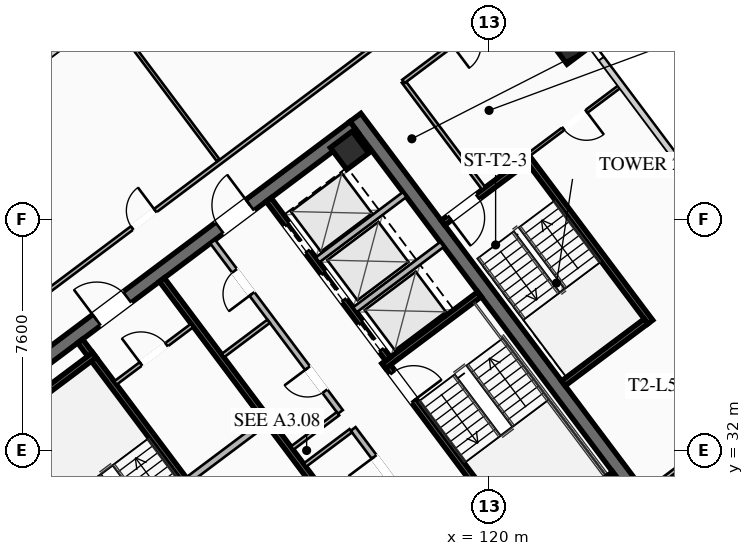
"""IFC4 building model, lengths in metres.
Left out: names, types, materials, properties, quantities, classifications, styles, units other than length and angle.
Written with IfcOpenShell. Run it as: python <this file> out.ifc"""

import sys

from ifc_helpers import new_model, si_unit, direction, frame, frame_2d, origin, origin_2d, place, context, subcontext, project, spatial, rectangle, hollow_rectangle, extrude, element, fill, save


model = new_model("IFC4")
c1 = context("Model", 3, precision=1e-05, world=origin(), true_north=direction((0.0, 1.0)))
c2 = subcontext(c1, "Body", "Model", "MODEL_VIEW")
j1 = project(units=[si_unit("LENGTHUNIT", "METRE"), si_unit("PLANEANGLEUNIT", "RADIAN")], contexts=[c1])
p1 = place(None, origin())
s1 = spatial("IfcSite", under=j1, at=p1, CompositionType="ELEMENT")
p2 = place(p1, origin())
s2 = spatial("IfcBuilding", under=s1, at=p2, CompositionType="ELEMENT")
p3 = place(p2, frame((0.0, 0.0, 207.75)))
s3 = spatial("IfcBuildingStorey", under=s2, at=p3, CompositionType="ELEMENT", Elevation=207.75)
for number, where, z_axis, x_axis in (
    (1, (112.396, 21.047, 0.0), (0.0, 0.0, 1.0), (-0.6, 0.8, 0.0)),
    (2, (115.604, 42.953, 0.0), (0.0, 0.0, 1.0), (0.6, -0.8, 0.0)),
):
    element("IfcWall", number, at=place(p3, frame(where, z_axis=z_axis, x_axis=x_axis)), inside=s3, PredefinedType="SHEAR", context=c2, shape_type="SweptSolid", body=[
        extrude(rectangle(XDim=15.6, YDim=0.45, at=frame_2d((7.8, 0.0))), origin(), (0.0, 0.0, 1.0), 3.55),
    ])
p4 = place(p3, frame((103.351, 33.482, 0.0), z_axis=(0.0, 0.0, 1.0), x_axis=(0.8, 0.6, 0.0)))
e3 = element("IfcWall", 3, at=p4, inside=s3, PredefinedType="SHEAR", context=c2, shape_type="SweptSolid", body=[
    extrude(rectangle(XDim=15.26, YDim=0.45, at=frame_2d((7.63, 0.0))), origin(), (0.0, 0.0, 1.0), 3.55),
])
p5 = place(p4, frame((4.68, 0.0, 0.0)))
e4 = element("IfcOpeningElement", 4, at=p5, cuts=e3, PredefinedType="OPENING", context=c2, shape_type="SweptSolid", body=[
    extrude(rectangle(XDim=1.25, YDim=2.25, at=frame_2d((0.625, 1.125))), frame((0.0, 0.235, 0.0), z_axis=(0.0, -1.0, 0.0), x_axis=(1.0, 0.0, 0.0)), (0.0, 0.0, 1.0), 0.47),
])
p6 = place(p4, frame((9.73, 0.0, 0.0)))
e5 = element("IfcOpeningElement", 5, at=p6, cuts=e3, PredefinedType="OPENING", context=c2, shape_type="SweptSolid", body=[
    extrude(rectangle(XDim=1.25, YDim=2.25, at=frame_2d((0.625, 1.125))), frame((0.0, 0.235, 0.0), z_axis=(0.0, -1.0, 0.0), x_axis=(1.0, 0.0, 0.0)), (0.0, 0.0, 1.0), 0.47),
])
for number, where, z_axis, x_axis in (
    (6, (123.87, 30.59, 0.0), (0.0, 0.0, 1.0), (0.8, 0.6, 0.0)),
    (7, (115.41, 41.87, 0.0), (0.0, 0.0, 1.0), (0.8, 0.6, 0.0)),
):
    element("IfcColumn", number, at=place(p3, frame(where, z_axis=z_axis, x_axis=x_axis)), inside=s3, PredefinedType="COLUMN", context=c2, shape_type="SweptSolid", body=[
        extrude(hollow_rectangle(XDim=0.9, YDim=0.9, WallThickness=0.04, at=origin_2d()), origin(), (0.0, 0.0, 1.0), 3.37),
    ])
p7 = place(p3, frame((122.64, 45.23, 0.0), z_axis=(0.0, 0.0, 1.0), x_axis=(0.799999996291, 0.600000004945, 0.0)))
e8 = element("IfcColumn", 8, at=p7, inside=s3, PredefinedType="COLUMN", context=c2, shape_type="SweptSolid", body=[
    extrude(hollow_rectangle(XDim=0.75, YDim=0.75, WallThickness=0.032, at=origin_2d()), origin(), (0.0, 0.0, 1.0), 3.37),
])
p8 = place(p3, frame((111.44, 29.08, 0.0), z_axis=(0.0, 0.0, 1.0), x_axis=(-0.59999041401, 0.800007189403, 0.0)))
e9 = element("IfcWall", 9, at=p8, inside=s3, PredefinedType="SHEAR", context=c2, shape_type="SweptSolid", body=[
    extrude(rectangle(XDim=8.15, YDim=0.2, at=frame_2d((4.075, 0.0))), origin(), (0.0, 0.0, 1.0), 3.37),
])
p9 = place(p8, frame((0.45, 0.0, 0.0)))
e10 = element("IfcOpeningElement", 10, at=p9, cuts=e9, PredefinedType="OPENING", context=c2, shape_type="SweptSolid", body=[
    extrude(rectangle(XDim=1.15, YDim=2.2, at=frame_2d((0.575, 1.1))), frame((0.0, 0.11, 0.0), z_axis=(0.0, -1.0, 0.0), x_axis=(1.0, 0.0, 0.0)), (0.0, 0.0, 1.0), 0.22),
])
p10 = place(p3, frame((103.876, 32.782, 0.0), z_axis=(0.0, 0.0, 1.0), x_axis=(0.800014909178, 0.599980120581, 0.0)))
e11 = element("IfcWall", 11, at=p10, inside=s3, PredefinedType="SHEAR", context=c2, shape_type="SweptSolid", body=[
    extrude(rectangle(XDim=3.93, YDim=0.2, at=frame_2d((1.965, 0.0))), origin(), (0.0, 0.0, 1.0), 3.37),
])
p11 = place(p3, frame((116.56, 34.92, 0.0), z_axis=(0.0, 0.0, 1.0), x_axis=(0.59999041401, -0.800007189403, 0.0)))
e12 = element("IfcWall", 12, at=p11, inside=s3, PredefinedType="SHEAR", context=c2, shape_type="SweptSolid", body=[
    extrude(rectangle(XDim=8.15, YDim=0.2, at=frame_2d((4.075, 0.0))), origin(), (0.0, 0.0, 1.0), 3.37),
])
p12 = place(p11, frame((0.45, 0.0, 0.0)))
e13 = element("IfcOpeningElement", 13, at=p12, cuts=e12, PredefinedType="OPENING", context=c2, shape_type="SweptSolid", body=[
    extrude(rectangle(XDim=1.15, YDim=2.2, at=frame_2d((0.575, 1.1))), frame((0.0, 0.11, 0.0), z_axis=(0.0, -1.0, 0.0), x_axis=(1.0, 0.0, 0.0)), (0.0, 0.0, 1.0), 0.22),
])
for number, where, z_axis, x_axis in (
    (14, (116.54, 34.78, 0.0), (0.0, 0.0, 1.0), (0.8, 0.6, 0.0)),
    (15, (120.98, 28.86, 0.0), (0.0, 0.0, 1.0), (0.8, 0.6, 0.0)),
):
    element("IfcWall", number, at=place(p3, frame(where, z_axis=z_axis, x_axis=x_axis)), inside=s3, PredefinedType="SHEAR", context=c2, shape_type="SweptSolid", body=[
        extrude(rectangle(XDim=3.93, YDim=0.2, at=frame_2d((1.965, 0.0))), origin(), (0.0, 0.0, 1.0), 3.37),
    ])
p13 = place(p3, frame((118.058, 25.856, 0.0), z_axis=(0.0, 0.0, 1.0), x_axis=(-0.600002657301, 0.799998007018, 0.0)))
e16 = element("IfcWall", 16, at=p13, inside=s3, PredefinedType="SHEAR", context=c2, shape_type="SweptSolid", body=[
    extrude(rectangle(XDim=14.7, YDim=0.2, at=frame_2d((7.35, 0.0))), origin(), (0.0, 0.0, 1.0), 3.37),
])
p14 = place(p3, frame((110.104, 31.028, 0.0), z_axis=(0.0, 0.0, 1.0), x_axis=(0.800018601094, 0.59997519774, 0.0)))
e17 = element("IfcWall", 17, at=p14, inside=s3, PredefinedType="SOLIDWALL", context=c2, shape_type="SweptSolid", body=[
    extrude(rectangle(XDim=3.15, YDim=0.22, at=frame_2d((1.575, 0.0))), origin(), (0.0, 0.0, 1.0), 2.723),
])
p15 = place(p3, frame((112.75, 40.25, 0.0), z_axis=(0.0, 0.0, 1.0), x_axis=(0.599994036198, -0.800004472816, 0.0)))
e18 = element("IfcWall", 18, at=p15, inside=s3, PredefinedType="SHEAR", context=c2, shape_type="SweptSolid", body=[
    extrude(rectangle(XDim=6.55, YDim=0.2, at=frame_2d((3.275, 0.0))), origin(), (0.0, 0.0, 1.0), 3.37),
])
p16 = place(p15, frame((5.075, 0.0, 0.0)))
e19 = element("IfcOpeningElement", 19, at=p16, cuts=e18, PredefinedType="OPENING", context=c2, shape_type="SweptSolid", body=[
    extrude(rectangle(XDim=1.1, YDim=2.2, at=frame_2d((0.55, 1.1))), frame((0.0, 0.11, 0.0), z_axis=(0.0, -1.0, 0.0), x_axis=(1.0, 0.0, 0.0)), (0.0, 0.0, 1.0), 0.22),
])
p17 = place(p15, frame((3.025, 0.0, 0.0)))
e20 = element("IfcOpeningElement", 20, at=p17, cuts=e18, PredefinedType="OPENING", context=c2, shape_type="SweptSolid", body=[
    extrude(rectangle(XDim=1.1, YDim=2.2, at=frame_2d((0.55, 1.1))), frame((0.0, 0.11, 0.0), z_axis=(0.0, -1.0, 0.0), x_axis=(1.0, 0.0, 0.0)), (0.0, 0.0, 1.0), 0.22),
])
p18 = place(p15, frame((1.025, 0.0, 0.0)))
e21 = element("IfcOpeningElement", 21, at=p18, cuts=e18, PredefinedType="OPENING", context=c2, shape_type="SweptSolid", body=[
    extrude(rectangle(XDim=1.1, YDim=2.2, at=frame_2d((0.55, 1.1))), frame((0.0, 0.11, 0.0), z_axis=(0.0, -1.0, 0.0), x_axis=(1.0, 0.0, 0.0)), (0.0, 0.0, 1.0), 0.22),
])
for number, where, z_axis, x_axis in (
    (22, (115.59, 36.63, 0.0), (0.0, 0.0, 1.0), (0.8, 0.6, 0.0)),
    (23, (114.36, 38.27, 0.0), (0.0, 0.0, 1.0), (0.8, 0.6, 0.0)),
):
    element("IfcWall", number, at=place(p3, frame(where, z_axis=z_axis, x_axis=x_axis)), inside=s3, PredefinedType="SOLIDWALL", context=c2, shape_type="SweptSolid", body=[
        extrude(rectangle(XDim=3.58, YDim=0.2, at=frame_2d((1.79, 0.0))), origin(), (0.0, 0.0, 1.0), 3.37),
    ])
p19 = place(p3, frame((107.71, 34.22, 0.0), z_axis=(0.0, 0.0, 1.0), x_axis=(0.799981399002, 0.60002480053, 0.0)))
e24 = element("IfcWall", 24, at=p19, inside=s3, PredefinedType="PARTITIONING", context=c2, shape_type="SweptSolid", body=[
    extrude(rectangle(XDim=3.15, YDim=0.135, at=frame_2d((1.575, 0.0))), origin(), (0.0, 0.0, 1.0), 2.723),
])
p20 = place(p19, frame((1.05, 0.0, 0.0)))
e25 = element("IfcOpeningElement", 25, at=p20, cuts=e24, PredefinedType="OPENING", context=c2, shape_type="SweptSolid", body=[
    extrude(rectangle(XDim=1.05, YDim=2.2, at=frame_2d((0.525, 1.1))), frame((0.0, 0.077, 0.0), z_axis=(0.0, -1.0, 0.0), x_axis=(1.0, 0.0, 0.0)), (0.0, 0.0, 1.0), 0.155),
])
p21 = place(p3, frame((119.73, 27.11, 0.0), z_axis=(0.0, 0.0, 1.0), x_axis=(-0.600005580459, 0.799995814625, 0.0)))
e26 = element("IfcWall", 26, at=p21, inside=s3, PredefinedType="SOLIDWALL", context=c2, shape_type="SweptSolid", body=[
    extrude(rectangle(XDim=7.0, YDim=0.2, at=frame_2d((3.5, 0.0))), origin(), (0.0, 0.0, 1.0), 2.723),
])
p22 = place(p21, frame((0.85, 0.0, 0.0)))
e27 = element("IfcOpeningElement", 27, at=p22, cuts=e26, PredefinedType="OPENING", context=c2, shape_type="SweptSolid", body=[
    extrude(rectangle(XDim=0.95, YDim=2.05, at=frame_2d((0.475, 1.025))), frame((0.0, 0.11, 0.0), z_axis=(0.0, -1.0, 0.0), x_axis=(1.0, 0.0, 0.0)), (0.0, 0.0, 1.0), 0.22),
])
p23 = place(p21, frame((4.8, 0.0, 0.0)))
e28 = element("IfcOpeningElement", 28, at=p23, cuts=e26, PredefinedType="OPENING", context=c2, shape_type="SweptSolid", body=[
    extrude(rectangle(XDim=1.05, YDim=2.2, at=frame_2d((0.525, 1.1))), frame((0.0, 0.11, 0.0), z_axis=(0.0, -1.0, 0.0), x_axis=(1.0, 0.0, 0.0)), (0.0, 0.0, 1.0), 0.22),
])
p24 = place(p3, frame((113.946, 31.522, 0.0), z_axis=(0.0, 0.0, 1.0), x_axis=(0.8, 0.6, 0.0)))
e29 = element("IfcWall", 29, at=p24, inside=s3, PredefinedType="PARTITIONING", context=c2, shape_type="SweptSolid", body=[
    extrude(rectangle(XDim=1.88, YDim=0.135, at=frame_2d((0.94, 0.0))), origin(), (0.0, 0.0, 1.0), 2.723),
])
p25 = place(p3, frame((115.11, 33.27, 0.0), z_axis=(0.0, 0.0, 1.0), x_axis=(-0.600011160345, 0.79999162962, 0.0)))
e30 = element("IfcWall", 30, at=p25, inside=s3, PredefinedType="SOLIDWALL", context=c2, shape_type="SweptSolid", body=[
    extrude(rectangle(XDim=7.0, YDim=0.2, at=frame_2d((3.5, 0.0))), origin(), (0.0, 0.0, 1.0), 2.723),
])
p26 = place(p25, frame((0.85, 0.0, 0.0)))
e31 = element("IfcOpeningElement", 31, at=p26, cuts=e30, PredefinedType="OPENING", context=c2, shape_type="SweptSolid", body=[
    extrude(rectangle(XDim=0.95, YDim=2.05, at=frame_2d((0.475, 1.025))), frame((0.0, 0.11, 0.0), z_axis=(0.0, -1.0, 0.0), x_axis=(1.0, 0.0, 0.0)), (0.0, 0.0, 1.0), 0.22),
])
p27 = place(p25, frame((4.85, 0.0, 0.0)))
e32 = element("IfcOpeningElement", 32, at=p27, cuts=e30, PredefinedType="OPENING", context=c2, shape_type="SweptSolid", body=[
    extrude(rectangle(XDim=0.95, YDim=2.05, at=frame_2d((0.475, 1.025))), frame((0.0, 0.11, 0.0), z_axis=(0.0, -1.0, 0.0), x_axis=(1.0, 0.0, 0.0)), (0.0, 0.0, 1.0), 0.22),
])
p28 = place(p3, frame((113.526, 32.082, 0.0), z_axis=(0.0, 0.0, 1.0), x_axis=(0.800046745961, 0.599937666993, 0.0)))
e33 = element("IfcWall", 33, at=p28, inside=s3, PredefinedType="PARTITIONING", context=c2, shape_type="SweptSolid", body=[
    extrude(rectangle(XDim=1.88, YDim=0.135, at=frame_2d((0.94, 0.0))), origin(), (0.0, 0.0, 1.0), 2.723),
])
p29 = place(p3, frame((111.246, 35.122, 0.0), z_axis=(0.0, 0.0, 1.0), x_axis=(0.8, 0.6, 0.0)))
e34 = element("IfcWall", 34, at=p29, inside=s3, PredefinedType="PARTITIONING", context=c2, shape_type="SweptSolid", body=[
    extrude(rectangle(XDim=1.88, YDim=0.135, at=frame_2d((0.94, 0.0))), origin(), (0.0, 0.0, 1.0), 2.723),
])
p30 = place(p3, frame((125.304, 36.228, 0.0), z_axis=(0.0, 0.0, 1.0), x_axis=(-0.59998851072, 0.800008616831, 0.0)))
e35 = element("IfcWall", 35, at=p30, inside=s3, PredefinedType="SHEAR", context=c2, shape_type="SweptSolid", body=[
    extrude(rectangle(XDim=6.8, YDim=0.2, at=frame_2d((3.4, 0.0))), origin(), (0.0, 0.0, 1.0), 3.37),
])
p31 = place(p3, frame((121.204, 41.528, 0.0), z_axis=(0.0, 0.0, 1.0), x_axis=(-0.800017232136, -0.599977023131, 0.0)))
e36 = element("IfcWall", 36, at=p31, inside=s3, PredefinedType="SHEAR", context=c2, shape_type="SweptSolid", body=[
    extrude(rectangle(XDim=3.4, YDim=0.2, at=frame_2d((1.7, 0.0))), origin(), (0.0, 0.0, 1.0), 3.37),
])
p32 = place(p31, frame((1.975, 0.0, 0.0)))
e37 = element("IfcOpeningElement", 37, at=p32, cuts=e36, PredefinedType="OPENING", context=c2, shape_type="SweptSolid", body=[
    extrude(rectangle(XDim=1.15, YDim=2.2, at=frame_2d((0.575, 1.1))), frame((0.0, 0.11, 0.0), z_axis=(0.0, -1.0, 0.0), x_axis=(1.0, 0.0, 0.0)), (0.0, 0.0, 1.0), 0.22),
])
p33 = place(p3, frame((122.444, 34.208, 0.0), z_axis=(0.0, 0.0, 1.0), x_axis=(0.79999138319, 0.600011488909, 0.0)))
e38 = element("IfcWall", 38, at=p33, inside=s3, PredefinedType="SHEAR", context=c2, shape_type="SweptSolid", body=[
    extrude(rectangle(XDim=3.4, YDim=0.2, at=frame_2d((1.7, 0.0))), origin(), (0.0, 0.0, 1.0), 3.37),
])
p34 = place(p3, frame((119.824, 40.618, 0.0), z_axis=(0.0, 0.0, 1.0), x_axis=(-0.599982243973, 0.800013316712, 0.0)))
e39 = element("IfcWall", 39, at=p34, inside=s3, PredefinedType="PARTITIONING", context=c2, shape_type="SweptSolid", body=[
    extrude(rectangle(XDim=4.4, YDim=0.135, at=frame_2d((2.2, 0.0))), origin(), (0.0, 0.0, 1.0), 2.723),
])
p35 = place(p3, frame((100.756, 33.692, 0.0), z_axis=(0.0, 0.0, 1.0), x_axis=(0.799998716732, 0.60000171102, 0.0)))
e40 = element("IfcWall", 40, at=p35, inside=s3, PredefinedType="PARTITIONING", context=c2, shape_type="SweptSolid", body=[
    extrude(rectangle(XDim=22.83, YDim=0.135, at=frame_2d((11.415, 0.0))), origin(), (0.0, 0.0, 1.0), 2.723),
])
p36 = place(p35, frame((9.38, 0.0, 0.0)))
e41 = element("IfcOpeningElement", 41, at=p36, cuts=e40, PredefinedType="OPENING", context=c2, shape_type="SweptSolid", body=[
    extrude(rectangle(XDim=0.95, YDim=2.05, at=frame_2d((0.475, 1.025))), frame((0.0, 0.077, 0.0), z_axis=(0.0, -1.0, 0.0), x_axis=(1.0, 0.0, 0.0)), (0.0, 0.0, 1.0), 0.155),
])
p37 = place(p35, frame((21.58, 0.0, 0.0)))
e42 = element("IfcOpeningElement", 42, at=p37, cuts=e40, PredefinedType="OPENING", context=c2, shape_type="SweptSolid", body=[
    extrude(rectangle(XDim=0.95, YDim=2.05, at=frame_2d((0.475, 1.025))), frame((0.0, 0.077, 0.0), z_axis=(0.0, -1.0, 0.0), x_axis=(1.0, 0.0, 0.0)), (0.0, 0.0, 1.0), 0.155),
])
p38 = place(p3, frame((111.092, 41.544, 0.0), z_axis=(0.0, 0.0, 1.0), x_axis=(-0.600006403464, 0.799995197362, 0.0)))
e43 = element("IfcWall", 43, at=p38, inside=s3, PredefinedType="PARTITIONING", context=c2, shape_type="SweptSolid", body=[
    extrude(rectangle(XDim=6.1, YDim=0.11, at=frame_2d((3.05, 0.0))), origin(), (0.0, 0.0, 1.0), 2.723),
])
p39 = place(p3, frame((121.704, 47.528, 0.0), z_axis=(0.0, 0.0, 1.0), x_axis=(-0.799989629485, -0.600013827105, 0.0)))
e44 = element("IfcWall", 44, at=p39, inside=s3, PredefinedType="PARTITIONING", context=c2, shape_type="SweptSolid", body=[
    extrude(rectangle(XDim=5.65, YDim=0.135, at=frame_2d((2.825, 0.0))), origin(), (0.0, 0.0, 1.0), 2.723),
])
p40 = place(p39, frame((2.7, 0.0, 0.0)))
e45 = element("IfcOpeningElement", 45, at=p40, cuts=e44, PredefinedType="OPENING", context=c2, shape_type="SweptSolid", body=[
    extrude(rectangle(XDim=0.95, YDim=2.05, at=frame_2d((0.475, 1.025))), frame((0.0, 0.077, 0.0), z_axis=(0.0, -1.0, 0.0), x_axis=(1.0, 0.0, 0.0)), (0.0, 0.0, 1.0), 0.155),
])
p41 = place(p3, frame((125.208, 30.656, 0.0), z_axis=(0.0, 0.0, 1.0), x_axis=(0.79999199534, 0.600010672732, 0.0)))
e46 = element("IfcWall", 46, at=p41, inside=s3, PredefinedType="PARTITIONING", context=c2, shape_type="SweptSolid", body=[
    extrude(rectangle(XDim=7.32, YDim=0.135, at=frame_2d((3.66, 0.0))), origin(), (0.0, 0.0, 1.0), 2.723),
])
p42 = place(p3, frame((124.344, 44.008, 0.0), z_axis=(0.0, 0.0, 1.0), x_axis=(-0.8, -0.6, 0.0)))
e47 = element("IfcWall", 47, at=p42, inside=s3, PredefinedType="PARTITIONING", context=c2, shape_type="SweptSolid", body=[
    extrude(rectangle(XDim=3.8, YDim=0.11, at=frame_2d((1.9, 0.0))), origin(), (0.0, 0.0, 1.0), 2.723),
])
p43 = place(p42, frame((1.425, 0.0, 0.0)))
e48 = element("IfcOpeningElement", 48, at=p43, cuts=e47, PredefinedType="OPENING", context=c2, shape_type="SweptSolid", body=[
    extrude(rectangle(XDim=0.95, YDim=2.05, at=frame_2d((0.475, 1.025))), frame((0.0, 0.065, 0.0), z_axis=(0.0, -1.0, 0.0), x_axis=(1.0, 0.0, 0.0)), (0.0, 0.0, 1.0), 0.13),
])
p44 = place(p3, frame((113.23, 17.06, 0.0), z_axis=(0.0, 0.0, 1.0), x_axis=(-0.600003772342, 0.79999717073, 0.0)))
e49 = element("IfcWall", 49, at=p44, inside=s3, PredefinedType="PARTITIONING", context=c2, shape_type="SweptSolid", body=[
    extrude(rectangle(XDim=20.71, YDim=0.135, at=frame_2d((10.355, 0.0))), origin(), (0.0, 0.0, 1.0), 2.723),
])
p45 = place(p44, frame((0.3, 0.0, 0.0)))
e50 = element("IfcOpeningElement", 50, at=p45, cuts=e49, PredefinedType="OPENING", context=c2, shape_type="SweptSolid", body=[
    extrude(rectangle(XDim=0.95, YDim=2.05, at=frame_2d((0.475, 1.025))), frame((0.0, 0.077, 0.0), z_axis=(0.0, -1.0, 0.0), x_axis=(1.0, 0.0, 0.0)), (0.0, 0.0, 1.0), 0.155),
])
p46 = place(p44, frame((11.272, 0.0, 0.0)))
e51 = element("IfcOpeningElement", 51, at=p46, cuts=e49, PredefinedType="OPENING", context=c2, shape_type="SweptSolid", body=[
    extrude(rectangle(XDim=0.95, YDim=2.05, at=frame_2d((0.475, 1.025))), frame((0.0, 0.077, 0.0), z_axis=(0.0, -1.0, 0.0), x_axis=(1.0, 0.0, 0.0)), (0.0, 0.0, 1.0), 0.155),
])
p47 = place(p44, frame((19.46, 0.0, 0.0)))
e52 = element("IfcOpeningElement", 52, at=p47, cuts=e49, PredefinedType="OPENING", context=c2, shape_type="SweptSolid", body=[
    extrude(rectangle(XDim=0.95, YDim=2.05, at=frame_2d((0.475, 1.025))), frame((0.0, 0.077, 0.0), z_axis=(0.0, -1.0, 0.0), x_axis=(1.0, 0.0, 0.0)), (0.0, 0.0, 1.0), 0.155),
])
p48 = place(p5, origin())
e53 = element("IfcDoor", 53, at=p48, inside=s3, OperationType="SINGLE_SWING_LEFT", PredefinedType="DOOR", context=c2, shape_type="SweptSolid", body=[
    extrude(rectangle(XDim=1.25, YDim=2.25, at=frame_2d((0.625, 1.125))), frame((0.0, 0.025, 0.0), z_axis=(0.0, -1.0, 0.0), x_axis=(1.0, 0.0, 0.0)), (0.0, 0.0, 1.0), 0.05),
])
fill(e4, e53)
p49 = place(p6, origin())
e54 = element("IfcDoor", 54, at=p49, inside=s3, OperationType="SINGLE_SWING_RIGHT", PredefinedType="DOOR", context=c2, shape_type="SweptSolid", body=[
    extrude(rectangle(XDim=1.25, YDim=2.25, at=frame_2d((0.625, 1.125))), frame((0.0, 0.025, 0.0), z_axis=(0.0, -1.0, 0.0), x_axis=(1.0, 0.0, 0.0)), (0.0, 0.0, 1.0), 0.05),
])
fill(e5, e54)
p50 = place(p12, origin())
e55 = element("IfcDoor", 55, at=p50, inside=s3, OperationType="SINGLE_SWING_RIGHT", PredefinedType="DOOR", context=c2, shape_type="SweptSolid", body=[
    extrude(rectangle(XDim=1.15, YDim=2.2, at=frame_2d((0.575, 1.1))), frame((0.0, 0.025, 0.0), z_axis=(0.0, -1.0, 0.0), x_axis=(1.0, 0.0, 0.0)), (0.0, 0.0, 1.0), 0.05),
])
fill(e13, e55)
p51 = place(p20, origin())
e56 = element("IfcDoor", 56, at=p51, inside=s3, OperationType="SINGLE_SWING_LEFT", PredefinedType="DOOR", context=c2, shape_type="SweptSolid", body=[
    extrude(rectangle(XDim=1.05, YDim=2.2, at=frame_2d((0.525, 1.1))), frame((0.0, 0.025, 0.0), z_axis=(0.0, -1.0, 0.0), x_axis=(1.0, 0.0, 0.0)), (0.0, 0.0, 1.0), 0.05),
])
fill(e25, e56)
p52 = place(p23, origin())
e57 = element("IfcDoor", 57, at=p52, inside=s3, OperationType="SINGLE_SWING_RIGHT", PredefinedType="DOOR", context=c2, shape_type="SweptSolid", body=[
    extrude(rectangle(XDim=1.05, YDim=2.2, at=frame_2d((0.525, 1.1))), frame((0.0, 0.025, 0.0), z_axis=(0.0, -1.0, 0.0), x_axis=(1.0, 0.0, 0.0)), (0.0, 0.0, 1.0), 0.05),
])
fill(e28, e57)
p53 = place(p26, origin())
e58 = element("IfcDoor", 58, at=p53, inside=s3, OperationType="SINGLE_SWING_RIGHT", PredefinedType="DOOR", context=c2, shape_type="SweptSolid", body=[
    extrude(rectangle(XDim=0.95, YDim=2.05, at=frame_2d((0.475, 1.025))), frame((0.0, 0.025, 0.0), z_axis=(0.0, -1.0, 0.0), x_axis=(1.0, 0.0, 0.0)), (0.0, 0.0, 1.0), 0.05),
])
fill(e31, e58)
p54 = place(p27, origin())
e59 = element("IfcDoor", 59, at=p54, inside=s3, OperationType="SINGLE_SWING_LEFT", PredefinedType="DOOR", context=c2, shape_type="SweptSolid", body=[
    extrude(rectangle(XDim=0.95, YDim=2.05, at=frame_2d((0.475, 1.025))), frame((0.0, 0.025, 0.0), z_axis=(0.0, -1.0, 0.0), x_axis=(1.0, 0.0, 0.0)), (0.0, 0.0, 1.0), 0.05),
])
fill(e32, e59)
p55 = place(p32, origin())
e60 = element("IfcDoor", 60, at=p55, inside=s3, OperationType="SINGLE_SWING_RIGHT", PredefinedType="DOOR", context=c2, shape_type="SweptSolid", body=[
    extrude(rectangle(XDim=1.15, YDim=2.2, at=frame_2d((0.575, 1.1))), frame((0.0, 0.025, 0.0), z_axis=(0.0, -1.0, 0.0), x_axis=(1.0, 0.0, 0.0)), (0.0, 0.0, 1.0), 0.05),
])
fill(e37, e60)
p56 = place(p36, origin())
e61 = element("IfcDoor", 61, at=p56, inside=s3, OperationType="SINGLE_SWING_RIGHT", PredefinedType="DOOR", context=c2, shape_type="SweptSolid", body=[
    extrude(rectangle(XDim=0.95, YDim=2.05, at=frame_2d((0.475, 1.025))), frame((0.0, 0.025, 0.0), z_axis=(0.0, -1.0, 0.0), x_axis=(1.0, 0.0, 0.0)), (0.0, 0.0, 1.0), 0.05),
])
fill(e41, e61)
p57 = place(p43, origin())
e62 = element("IfcDoor", 62, at=p57, inside=s3, OperationType="SINGLE_SWING_LEFT", PredefinedType="DOOR", context=c2, shape_type="SweptSolid", body=[
    extrude(rectangle(XDim=0.95, YDim=2.05, at=frame_2d((0.475, 1.025))), frame((0.0, 0.025, 0.0), z_axis=(0.0, -1.0, 0.0), x_axis=(1.0, 0.0, 0.0)), (0.0, 0.0, 1.0), 0.05),
])
fill(e48, e62)
p58 = place(p16, origin())
e63 = element("IfcDoor", 63, at=p58, inside=s3, OperationType="SLIDING_TO_LEFT", PredefinedType="DOOR", context=c2, shape_type="SweptSolid", body=[
    extrude(rectangle(XDim=1.1, YDim=2.2, at=frame_2d((0.55, 1.1))), frame((0.0, 0.025, 0.0), z_axis=(0.0, -1.0, 0.0), x_axis=(1.0, 0.0, 0.0)), (0.0, 0.0, 1.0), 0.05),
])
fill(e19, e63)
p59 = place(p17, origin())
e64 = element("IfcDoor", 64, at=p59, inside=s3, OperationType="SLIDING_TO_LEFT", PredefinedType="DOOR", context=c2, shape_type="SweptSolid", body=[
    extrude(rectangle(XDim=1.1, YDim=2.2, at=frame_2d((0.55, 1.1))), frame((0.0, 0.025, 0.0), z_axis=(0.0, -1.0, 0.0), x_axis=(1.0, 0.0, 0.0)), (0.0, 0.0, 1.0), 0.05),
])
fill(e20, e64)
p60 = place(p18, origin())
e65 = element("IfcDoor", 65, at=p60, inside=s3, OperationType="SLIDING_TO_LEFT", PredefinedType="DOOR", context=c2, shape_type="SweptSolid", body=[
    extrude(rectangle(XDim=1.1, YDim=2.2, at=frame_2d((0.55, 1.1))), frame((0.0, 0.025, 0.0), z_axis=(0.0, -1.0, 0.0), x_axis=(1.0, 0.0, 0.0)), (0.0, 0.0, 1.0), 0.05),
])
fill(e21, e65)
save(model, sys.argv[1])
